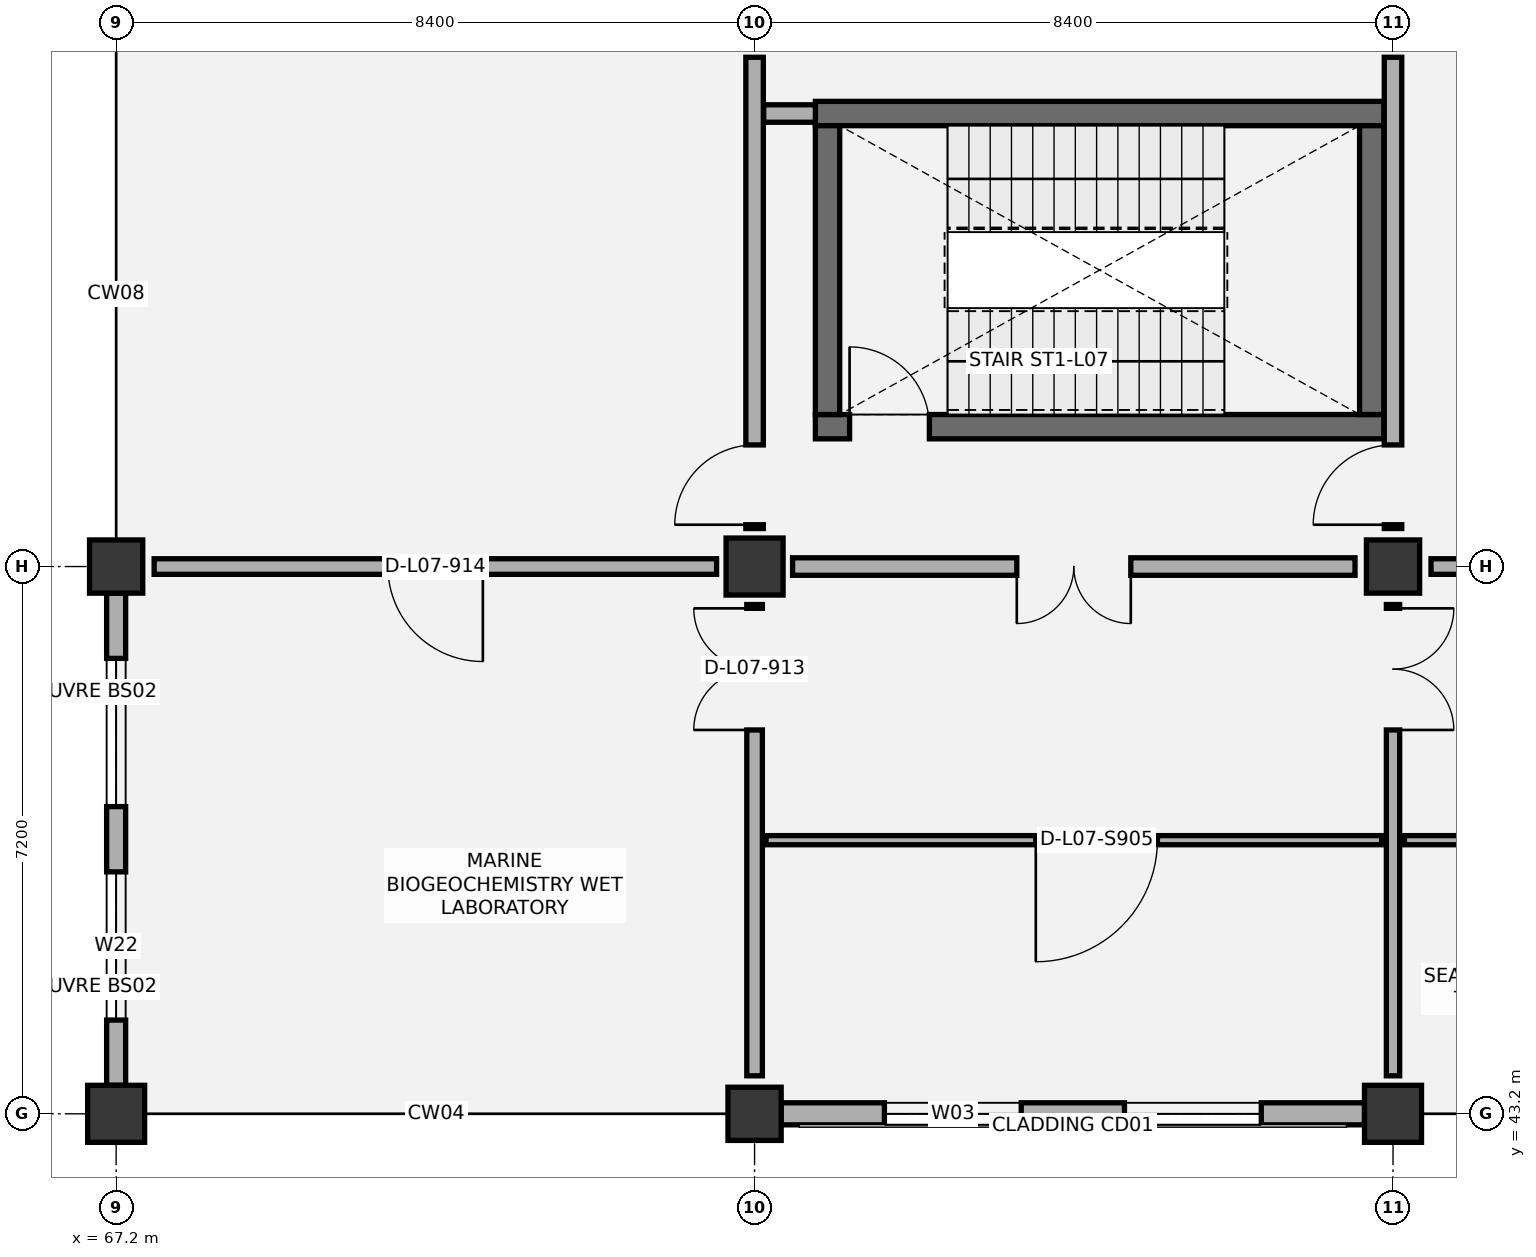
"""IFC4 building model, lengths in metres.
Left out: names, types, materials, properties, quantities, classifications, styles, units other than length and angle.
Written with IfcOpenShell. Run it as: python <this file> out.ifc"""

import sys

from ifc_helpers import new_model, si_unit, direction, frame, frame_2d, origin, origin_2d, place, context, subcontext, project, spatial, rectangle, extrude, element, fill, save


model = new_model("IFC4")
c1 = context("Model", 3, precision=1e-05, world=origin(), true_north=direction((0.0, 1.0)))
c2 = subcontext(c1, "Body", "Model", "MODEL_VIEW")
j1 = project(units=[si_unit("LENGTHUNIT", "METRE"), si_unit("PLANEANGLEUNIT", "RADIAN")], contexts=[c1])
p1 = place(None, origin())
s1 = spatial("IfcSite", under=j1, at=p1, CompositionType="ELEMENT")
p2 = place(p1, origin())
s2 = spatial("IfcBuilding", under=s1, at=p2, CompositionType="ELEMENT")
p3 = place(p2, frame((0.0, 0.0, 35.4)))
s3 = spatial("IfcBuildingStorey", under=s2, at=p3, CompositionType="ELEMENT", Elevation=35.4)
p4 = place(p3, frame((67.2, 43.2, 0.0), z_axis=(0.0, 0.0, 1.0), x_axis=(1.0, 0.0, 0.0)))
e1 = element("IfcColumn", 1, at=p4, inside=s3, PredefinedType="COLUMN", context=c2, shape_type="SweptSolid", body=[
    extrude(rectangle(XDim=0.75, YDim=0.75, at=origin_2d()), origin(), (0.0, 0.0, 1.0), 4.2),
])
for number, where, z_axis, x_axis in (
    (2, (67.2, 50.4, 0.0), (0.0, 0.0, 1.0), (1.0, 0.0, 0.0)),
    (3, (75.6, 43.2, 0.0), (0.0, 0.0, 1.0), (1.0, 0.0, 0.0)),
):
    element("IfcColumn", number, at=place(p3, frame(where, z_axis=z_axis, x_axis=x_axis)), inside=s3, PredefinedType="COLUMN", context=c2, shape_type="SweptSolid", body=[
        extrude(rectangle(XDim=0.7, YDim=0.7, at=origin_2d()), origin(), (0.0, 0.0, 1.0), 4.2),
    ])
for number, where, z_axis, x_axis in (
    (4, (75.6, 50.4, 0.0), (0.0, 0.0, 1.0), (1.0, 0.0, 0.0)),
    (5, (84.0, 43.2, 0.0), (0.0, 0.0, 1.0), (1.0, 0.0, 0.0)),
):
    element("IfcColumn", number, at=place(p3, frame(where, z_axis=z_axis, x_axis=x_axis)), inside=s3, PredefinedType="COLUMN", context=c2, shape_type="SweptSolid", body=[
        extrude(rectangle(XDim=0.75, YDim=0.75, at=origin_2d()), origin(), (0.0, 0.0, 1.0), 4.2),
    ])
p5 = place(p3, frame((84.0, 50.4, 0.0), z_axis=(0.0, 0.0, 1.0), x_axis=(1.0, 0.0, 0.0)))
e6 = element("IfcColumn", 6, at=p5, inside=s3, PredefinedType="COLUMN", context=c2, shape_type="SweptSolid", body=[
    extrude(rectangle(XDim=0.7, YDim=0.7, at=origin_2d()), origin(), (0.0, 0.0, 1.0), 4.2),
])
p6 = place(p3, frame((76.4, 52.24, 0.0), z_axis=(0.0, 0.0, 1.0), x_axis=(1.0, 0.0, 0.0)))
e7 = element("IfcWall", 7, at=p6, inside=s3, PredefinedType="SHEAR", context=c2, shape_type="SweptSolid", body=[
    extrude(rectangle(XDim=7.48, YDim=0.32, at=frame_2d((3.74, 0.0))), origin(), (0.0, 0.0, 1.0), 3.92),
])
p7 = place(p6, frame((0.45, 0.0, 0.0)))
e8 = element("IfcOpeningElement", 8, at=p7, cuts=e7, PredefinedType="OPENING", context=c2, shape_type="SweptSolid", body=[
    extrude(rectangle(XDim=1.05, YDim=2.15, at=frame_2d((0.525, 1.075))), frame((0.0, 0.17, 0.0), z_axis=(0.0, -1.0, 0.0), x_axis=(1.0, 0.0, 0.0)), (0.0, 0.0, 1.0), 0.34),
])
p8 = place(p3, frame((76.4, 56.36, 0.0), z_axis=(0.0, 0.0, 1.0), x_axis=(1.0, 0.0, 0.0)))
e9 = element("IfcWall", 9, at=p8, inside=s3, PredefinedType="SHEAR", context=c2, shape_type="SweptSolid", body=[
    extrude(rectangle(XDim=7.48, YDim=0.32, at=frame_2d((3.74, 0.0))), origin(), (0.0, 0.0, 1.0), 3.92),
])
for number, where, z_axis, x_axis in (
    (10, (76.56, 52.4, 0.0), (0.0, 0.0, 1.0), (0.0, 1.0, 0.0)),
    (11, (83.72, 52.4, 0.0), (0.0, 0.0, 1.0), (0.0, 1.0, 0.0)),
):
    element("IfcWall", number, at=place(p3, frame(where, z_axis=z_axis, x_axis=x_axis)), inside=s3, PredefinedType="SHEAR", context=c2, shape_type="SweptSolid", body=[
        extrude(rectangle(XDim=3.8, YDim=0.32, at=frame_2d((1.9, 0.0))), origin(), (0.0, 0.0, 1.0), 3.92),
    ])
p9 = place(p3, frame((67.2, 43.575, 0.0), z_axis=(0.0, 0.0, 1.0), x_axis=(0.0, 1.0, 0.0)))
e12 = element("IfcWall", 12, at=p9, inside=s3, PredefinedType="SOLIDWALL", context=c2, shape_type="SweptSolid", body=[
    extrude(rectangle(XDim=6.475, YDim=0.25, at=frame_2d((3.238, 0.0))), origin(), (0.0, 0.0, 1.0), 3.365),
])
p10 = place(p9, frame((0.858, 0.0, 0.9)))
e13 = element("IfcOpeningElement", 13, at=p10, cuts=e12, PredefinedType="OPENING", context=c2, shape_type="SweptSolid", body=[
    extrude(rectangle(XDim=1.95, YDim=1.95, at=frame_2d((0.975, 0.975))), frame((0.0, 0.135, 0.0), z_axis=(0.0, -1.0, 0.0), x_axis=(1.0, 0.0, 0.0)), (0.0, 0.0, 1.0), 0.27),
])
p11 = place(p9, frame((3.667, 0.0, 0.9)))
e14 = element("IfcOpeningElement", 14, at=p11, cuts=e12, PredefinedType="OPENING", context=c2, shape_type="SweptSolid", body=[
    extrude(rectangle(XDim=1.95, YDim=1.95, at=frame_2d((0.975, 0.975))), frame((0.0, 0.135, 0.0), z_axis=(0.0, -1.0, 0.0), x_axis=(1.0, 0.0, 0.0)), (0.0, 0.0, 1.0), 0.27),
])
p12 = place(p3, frame((75.95, 43.2, 0.0), z_axis=(0.0, 0.0, 1.0), x_axis=(1.0, 0.0, 0.0)))
e15 = element("IfcWall", 15, at=p12, inside=s3, PredefinedType="SOLIDWALL", context=c2, shape_type="SweptSolid", body=[
    extrude(rectangle(XDim=7.675, YDim=0.29, at=frame_2d((3.837, 0.0))), origin(), (0.0, 0.0, 1.0), 3.365),
])
p13 = place(p12, frame((1.358, 0.0, 0.9)))
e16 = element("IfcOpeningElement", 16, at=p13, cuts=e15, PredefinedType="OPENING", context=c2, shape_type="SweptSolid", body=[
    extrude(rectangle(XDim=1.8, YDim=1.8, at=frame_2d((0.9, 0.9))), frame((0.0, 0.155, 0.0), z_axis=(0.0, -1.0, 0.0), x_axis=(1.0, 0.0, 0.0)), (0.0, 0.0, 1.0), 0.31),
])
p14 = place(p12, frame((4.517, 0.0, 0.9)))
e17 = element("IfcOpeningElement", 17, at=p14, cuts=e15, PredefinedType="OPENING", context=c2, shape_type="SweptSolid", body=[
    extrude(rectangle(XDim=1.8, YDim=1.8, at=frame_2d((0.9, 0.9))), frame((0.0, 0.155, 0.0), z_axis=(0.0, -1.0, 0.0), x_axis=(1.0, 0.0, 0.0)), (0.0, 0.0, 1.0), 0.31),
])
p15 = place(p3, frame((75.75, 46.8, 0.0), z_axis=(0.0, 0.0, 1.0), x_axis=(1.0, 0.0, 0.0)))
e18 = element("IfcWall", 18, at=p15, inside=s3, PredefinedType="PARTITIONING", context=c2, shape_type="SweptSolid", body=[
    extrude(rectangle(XDim=8.1, YDim=0.12, at=frame_2d((4.05, 0.0))), origin(), (0.0, 0.0, 1.0), 3.92),
])
p16 = place(p15, frame((3.55, 0.0, 0.0)))
e19 = element("IfcOpeningElement", 19, at=p16, cuts=e18, PredefinedType="OPENING", context=c2, shape_type="SweptSolid", body=[
    extrude(rectangle(XDim=1.6, YDim=2.2, at=frame_2d((0.8, 1.1))), frame((0.0, 0.07, 0.0), z_axis=(0.0, -1.0, 0.0), x_axis=(1.0, 0.0, 0.0)), (0.0, 0.0, 1.0), 0.14),
])
p17 = place(p3, frame((84.15, 46.8, 0.0), z_axis=(0.0, 0.0, 1.0), x_axis=(1.0, 0.0, 0.0)))
e20 = element("IfcWall", 20, at=p17, inside=s3, PredefinedType="PARTITIONING", context=c2, shape_type="SweptSolid", body=[
    extrude(rectangle(XDim=8.1, YDim=0.12, at=frame_2d((4.05, 0.0))), origin(), (0.0, 0.0, 1.0), 3.92),
])
p18 = place(p17, frame((3.55, 0.0, 0.0)))
e21 = element("IfcOpeningElement", 21, at=p18, cuts=e20, PredefinedType="OPENING", context=c2, shape_type="SweptSolid", body=[
    extrude(rectangle(XDim=1.6, YDim=2.2, at=frame_2d((0.8, 1.1))), frame((0.0, 0.07, 0.0), z_axis=(0.0, -1.0, 0.0), x_axis=(1.0, 0.0, 0.0)), (0.0, 0.0, 1.0), 0.14),
])
p19 = place(p3, frame((75.6, 43.7, 0.0), z_axis=(0.0, 0.0, 1.0), x_axis=(0.0, 1.0, 0.0)))
e22 = element("IfcWall", 22, at=p19, inside=s3, PredefinedType="PARTITIONING", context=c2, shape_type="SweptSolid", body=[
    extrude(rectangle(XDim=6.2, YDim=0.205, at=frame_2d((3.1, 0.0))), origin(), (0.0, 0.0, 1.0), 3.415),
])
p20 = place(p19, frame((4.55, 0.0, 0.0)))
e23 = element("IfcOpeningElement", 23, at=p20, cuts=e22, PredefinedType="OPENING", context=c2, shape_type="SweptSolid", body=[
    extrude(rectangle(XDim=1.6, YDim=2.2, at=frame_2d((0.8, 1.1))), frame((0.0, 0.113, 0.0), z_axis=(0.0, -1.0, 0.0), x_axis=(1.0, 0.0, 0.0)), (0.0, 0.0, 1.0), 0.225),
])
p21 = place(p3, frame((67.7, 50.4, 0.0), z_axis=(0.0, 0.0, 1.0), x_axis=(1.0, 0.0, 0.0)))
e24 = element("IfcWall", 24, at=p21, inside=s3, PredefinedType="PARTITIONING", context=c2, shape_type="SweptSolid", body=[
    extrude(rectangle(XDim=7.4, YDim=0.205, at=frame_2d((3.7, 0.0))), origin(), (0.0, 0.0, 1.0), 3.265),
])
p22 = place(p21, frame((3.075, 0.0, 0.0)))
e25 = element("IfcOpeningElement", 25, at=p22, cuts=e24, PredefinedType="OPENING", context=c2, shape_type="SweptSolid", body=[
    extrude(rectangle(XDim=1.25, YDim=2.1, at=frame_2d((0.625, 1.05))), frame((0.0, 0.113, 0.0), z_axis=(0.0, -1.0, 0.0), x_axis=(1.0, 0.0, 0.0)), (0.0, 0.0, 1.0), 0.225),
])
p23 = place(p3, frame((75.6, 50.9, 0.0), z_axis=(0.0, 0.0, 1.0), x_axis=(0.0, 1.0, 0.0)))
e26 = element("IfcWall", 26, at=p23, inside=s3, PredefinedType="PARTITIONING", context=c2, shape_type="SweptSolid", body=[
    extrude(rectangle(XDim=6.2, YDim=0.23, at=frame_2d((3.1, 0.0))), origin(), (0.0, 0.0, 1.0), 3.315),
])
p24 = place(p23, frame((0.05, 0.0, 0.0)))
e27 = element("IfcOpeningElement", 27, at=p24, cuts=e26, PredefinedType="OPENING", context=c2, shape_type="SweptSolid", body=[
    extrude(rectangle(XDim=1.05, YDim=2.15, at=frame_2d((0.525, 1.075))), frame((0.0, 0.125, 0.0), z_axis=(0.0, -1.0, 0.0), x_axis=(1.0, 0.0, 0.0)), (0.0, 0.0, 1.0), 0.25),
])
p25 = place(p3, frame((84.0, 43.7, 0.0), z_axis=(0.0, 0.0, 1.0), x_axis=(0.0, 1.0, 0.0)))
e28 = element("IfcWall", 28, at=p25, inside=s3, PredefinedType="PARTITIONING", context=c2, shape_type="SweptSolid", body=[
    extrude(rectangle(XDim=6.2, YDim=0.175, at=frame_2d((3.1, 0.0))), origin(), (0.0, 0.0, 1.0), 3.315),
])
p26 = place(p25, frame((4.55, 0.0, 0.0)))
e29 = element("IfcOpeningElement", 29, at=p26, cuts=e28, PredefinedType="OPENING", context=c2, shape_type="SweptSolid", body=[
    extrude(rectangle(XDim=1.6, YDim=2.2, at=frame_2d((0.8, 1.1))), frame((0.0, 0.097, 0.0), z_axis=(0.0, -1.0, 0.0), x_axis=(1.0, 0.0, 0.0)), (0.0, 0.0, 1.0), 0.195),
])
p27 = place(p3, frame((76.1, 50.4, 0.0), z_axis=(0.0, 0.0, 1.0), x_axis=(1.0, 0.0, 0.0)))
e30 = element("IfcWall", 30, at=p27, inside=s3, PredefinedType="PARTITIONING", context=c2, shape_type="SweptSolid", body=[
    extrude(rectangle(XDim=7.4, YDim=0.23, at=frame_2d((3.7, 0.0))), origin(), (0.0, 0.0, 1.0), 3.565),
])
p28 = place(p27, frame((2.95, 0.0, 0.0)))
e31 = element("IfcOpeningElement", 31, at=p28, cuts=e30, PredefinedType="OPENING", context=c2, shape_type="SweptSolid", body=[
    extrude(rectangle(XDim=1.5, YDim=2.15, at=frame_2d((0.75, 1.075))), frame((0.0, 0.125, 0.0), z_axis=(0.0, -1.0, 0.0), x_axis=(1.0, 0.0, 0.0)), (0.0, 0.0, 1.0), 0.25),
])
p29 = place(p3, frame((84.0, 50.9, 0.0), z_axis=(0.0, 0.0, 1.0), x_axis=(0.0, 1.0, 0.0)))
e32 = element("IfcWall", 32, at=p29, inside=s3, PredefinedType="PARTITIONING", context=c2, shape_type="SweptSolid", body=[
    extrude(rectangle(XDim=6.2, YDim=0.23, at=frame_2d((3.1, 0.0))), origin(), (0.0, 0.0, 1.0), 3.515),
])
p30 = place(p29, frame((0.05, 0.0, 0.0)))
e33 = element("IfcOpeningElement", 33, at=p30, cuts=e32, PredefinedType="OPENING", context=c2, shape_type="SweptSolid", body=[
    extrude(rectangle(XDim=1.05, YDim=2.15, at=frame_2d((0.525, 1.075))), frame((0.0, 0.125, 0.0), z_axis=(0.0, -1.0, 0.0), x_axis=(1.0, 0.0, 0.0)), (0.0, 0.0, 1.0), 0.25),
])
p31 = place(p3, frame((75.72, 56.36, 0.0), z_axis=(0.0, 0.0, 1.0), x_axis=(1.0, 0.0, 0.0)))
e34 = element("IfcWall", 34, at=p31, inside=s3, PredefinedType="PARTITIONING", context=c2, shape_type="SweptSolid", body=[
    extrude(rectangle(XDim=0.68, YDim=0.23, at=frame_2d((0.34, 0.0))), origin(), (0.0, 0.0, 1.0), 3.92),
])
p32 = place(p3, frame((84.5, 50.4, 0.0), z_axis=(0.0, 0.0, 1.0), x_axis=(1.0, 0.0, 0.0)))
e35 = element("IfcWall", 35, at=p32, inside=s3, PredefinedType="PARTITIONING", context=c2, shape_type="SweptSolid", body=[
    extrude(rectangle(XDim=7.4, YDim=0.205, at=frame_2d((3.7, 0.0))), origin(), (0.0, 0.0, 1.0), 3.625),
])
p33 = place(p32, frame((2.95, 0.0, 0.0)))
e36 = element("IfcOpeningElement", 36, at=p33, cuts=e35, PredefinedType="OPENING", context=c2, shape_type="SweptSolid", body=[
    extrude(rectangle(XDim=1.5, YDim=2.2, at=frame_2d((0.75, 1.1))), frame((0.0, 0.113, 0.0), z_axis=(0.0, -1.0, 0.0), x_axis=(1.0, 0.0, 0.0)), (0.0, 0.0, 1.0), 0.225),
])
p34 = place(p10, origin())
e37 = element("IfcWindow", 37, at=p34, inside=s3, PartitioningType="SINGLE_PANEL", PredefinedType="WINDOW", context=c2, shape_type="SweptSolid", body=[
    extrude(rectangle(XDim=1.95, YDim=1.95, at=frame_2d((0.975, 0.975))), frame((0.0, 0.03, 0.0), z_axis=(0.0, -1.0, 0.0), x_axis=(1.0, 0.0, 0.0)), (0.0, 0.0, 1.0), 0.06),
])
fill(e13, e37)
p35 = place(p11, origin())
e38 = element("IfcWindow", 38, at=p35, inside=s3, PartitioningType="SINGLE_PANEL", PredefinedType="WINDOW", context=c2, shape_type="SweptSolid", body=[
    extrude(rectangle(XDim=1.95, YDim=1.95, at=frame_2d((0.975, 0.975))), frame((0.0, 0.03, 0.0), z_axis=(0.0, -1.0, 0.0), x_axis=(1.0, 0.0, 0.0)), (0.0, 0.0, 1.0), 0.06),
])
fill(e14, e38)
p36 = place(p13, origin())
e39 = element("IfcWindow", 39, at=p36, inside=s3, PartitioningType="SINGLE_PANEL", PredefinedType="WINDOW", context=c2, shape_type="SweptSolid", body=[
    extrude(rectangle(XDim=1.8, YDim=1.8, at=frame_2d((0.9, 0.9))), frame((0.0, 0.03, 0.0), z_axis=(0.0, -1.0, 0.0), x_axis=(1.0, 0.0, 0.0)), (0.0, 0.0, 1.0), 0.06),
])
fill(e16, e39)
p37 = place(p14, origin())
e40 = element("IfcWindow", 40, at=p37, inside=s3, PartitioningType="SINGLE_PANEL", PredefinedType="WINDOW", context=c2, shape_type="SweptSolid", body=[
    extrude(rectangle(XDim=1.8, YDim=1.8, at=frame_2d((0.9, 0.9))), frame((0.0, 0.03, 0.0), z_axis=(0.0, -1.0, 0.0), x_axis=(1.0, 0.0, 0.0)), (0.0, 0.0, 1.0), 0.06),
])
fill(e17, e40)
p38 = place(p7, origin())
e41 = element("IfcDoor", 41, at=p38, inside=s3, OperationType="SINGLE_SWING_LEFT", PredefinedType="DOOR", context=c2, shape_type="SweptSolid", body=[
    extrude(rectangle(XDim=1.05, YDim=2.15, at=frame_2d((0.525, 1.075))), frame((0.0, 0.025, 0.0), z_axis=(0.0, -1.0, 0.0), x_axis=(1.0, 0.0, 0.0)), (0.0, 0.0, 1.0), 0.05),
])
fill(e8, e41)
p39 = place(p16, frame((1.6, 0.0, 0.0), z_axis=(0.0, 0.0, 1.0), x_axis=(-1.0, 0.0, 0.0)))
e42 = element("IfcDoor", 42, at=p39, inside=s3, OperationType="SINGLE_SWING_RIGHT", PredefinedType="DOOR", context=c2, shape_type="SweptSolid", body=[
    extrude(rectangle(XDim=1.6, YDim=2.2, at=frame_2d((0.8, 1.1))), frame((0.0, 0.025, 0.0), z_axis=(0.0, -1.0, 0.0), x_axis=(1.0, 0.0, 0.0)), (0.0, 0.0, 1.0), 0.05),
])
fill(e19, e42)
p40 = place(p20, origin())
e43 = element("IfcDoor", 43, at=p40, inside=s3, OperationType="DOUBLE_DOOR_SINGLE_SWING", PredefinedType="DOOR", context=c2, shape_type="SweptSolid", body=[
    extrude(rectangle(XDim=1.6, YDim=2.2, at=frame_2d((0.8, 1.1))), frame((0.0, 0.025, 0.0), z_axis=(0.0, -1.0, 0.0), x_axis=(1.0, 0.0, 0.0)), (0.0, 0.0, 1.0), 0.05),
])
fill(e23, e43)
p41 = place(p22, frame((1.25, 0.0, 0.0), z_axis=(0.0, 0.0, 1.0), x_axis=(-1.0, 0.0, 0.0)))
e44 = element("IfcDoor", 44, at=p41, inside=s3, OperationType="SINGLE_SWING_LEFT", PredefinedType="DOOR", context=c2, shape_type="SweptSolid", body=[
    extrude(rectangle(XDim=1.25, YDim=2.1, at=frame_2d((0.625, 1.05))), frame((0.0, 0.025, 0.0), z_axis=(0.0, -1.0, 0.0), x_axis=(1.0, 0.0, 0.0)), (0.0, 0.0, 1.0), 0.05),
])
fill(e25, e44)
p42 = place(p24, origin())
e45 = element("IfcDoor", 45, at=p42, inside=s3, OperationType="SINGLE_SWING_LEFT", PredefinedType="DOOR", context=c2, shape_type="SweptSolid", body=[
    extrude(rectangle(XDim=1.05, YDim=2.15, at=frame_2d((0.525, 1.075))), frame((0.0, 0.025, 0.0), z_axis=(0.0, -1.0, 0.0), x_axis=(1.0, 0.0, 0.0)), (0.0, 0.0, 1.0), 0.05),
])
fill(e27, e45)
p43 = place(p26, frame((1.6, 0.0, 0.0), z_axis=(0.0, 0.0, 1.0), x_axis=(-1.0, 0.0, 0.0)))
e46 = element("IfcDoor", 46, at=p43, inside=s3, OperationType="DOUBLE_DOOR_SINGLE_SWING", PredefinedType="DOOR", context=c2, shape_type="SweptSolid", body=[
    extrude(rectangle(XDim=1.6, YDim=2.2, at=frame_2d((0.8, 1.1))), frame((0.0, 0.025, 0.0), z_axis=(0.0, -1.0, 0.0), x_axis=(1.0, 0.0, 0.0)), (0.0, 0.0, 1.0), 0.05),
])
fill(e29, e46)
p44 = place(p28, frame((1.5, 0.0, 0.0), z_axis=(0.0, 0.0, 1.0), x_axis=(-1.0, 0.0, 0.0)))
e47 = element("IfcDoor", 47, at=p44, inside=s3, OperationType="DOUBLE_DOOR_SINGLE_SWING", PredefinedType="DOOR", context=c2, shape_type="SweptSolid", body=[
    extrude(rectangle(XDim=1.5, YDim=2.15, at=frame_2d((0.75, 1.075))), frame((0.0, 0.025, 0.0), z_axis=(0.0, -1.0, 0.0), x_axis=(1.0, 0.0, 0.0)), (0.0, 0.0, 1.0), 0.05),
])
fill(e31, e47)
p45 = place(p30, origin())
e48 = element("IfcDoor", 48, at=p45, inside=s3, OperationType="SINGLE_SWING_LEFT", PredefinedType="DOOR", context=c2, shape_type="SweptSolid", body=[
    extrude(rectangle(XDim=1.05, YDim=2.15, at=frame_2d((0.525, 1.075))), frame((0.0, 0.025, 0.0), z_axis=(0.0, -1.0, 0.0), x_axis=(1.0, 0.0, 0.0)), (0.0, 0.0, 1.0), 0.05),
])
fill(e33, e48)
save(model, sys.argv[1])
